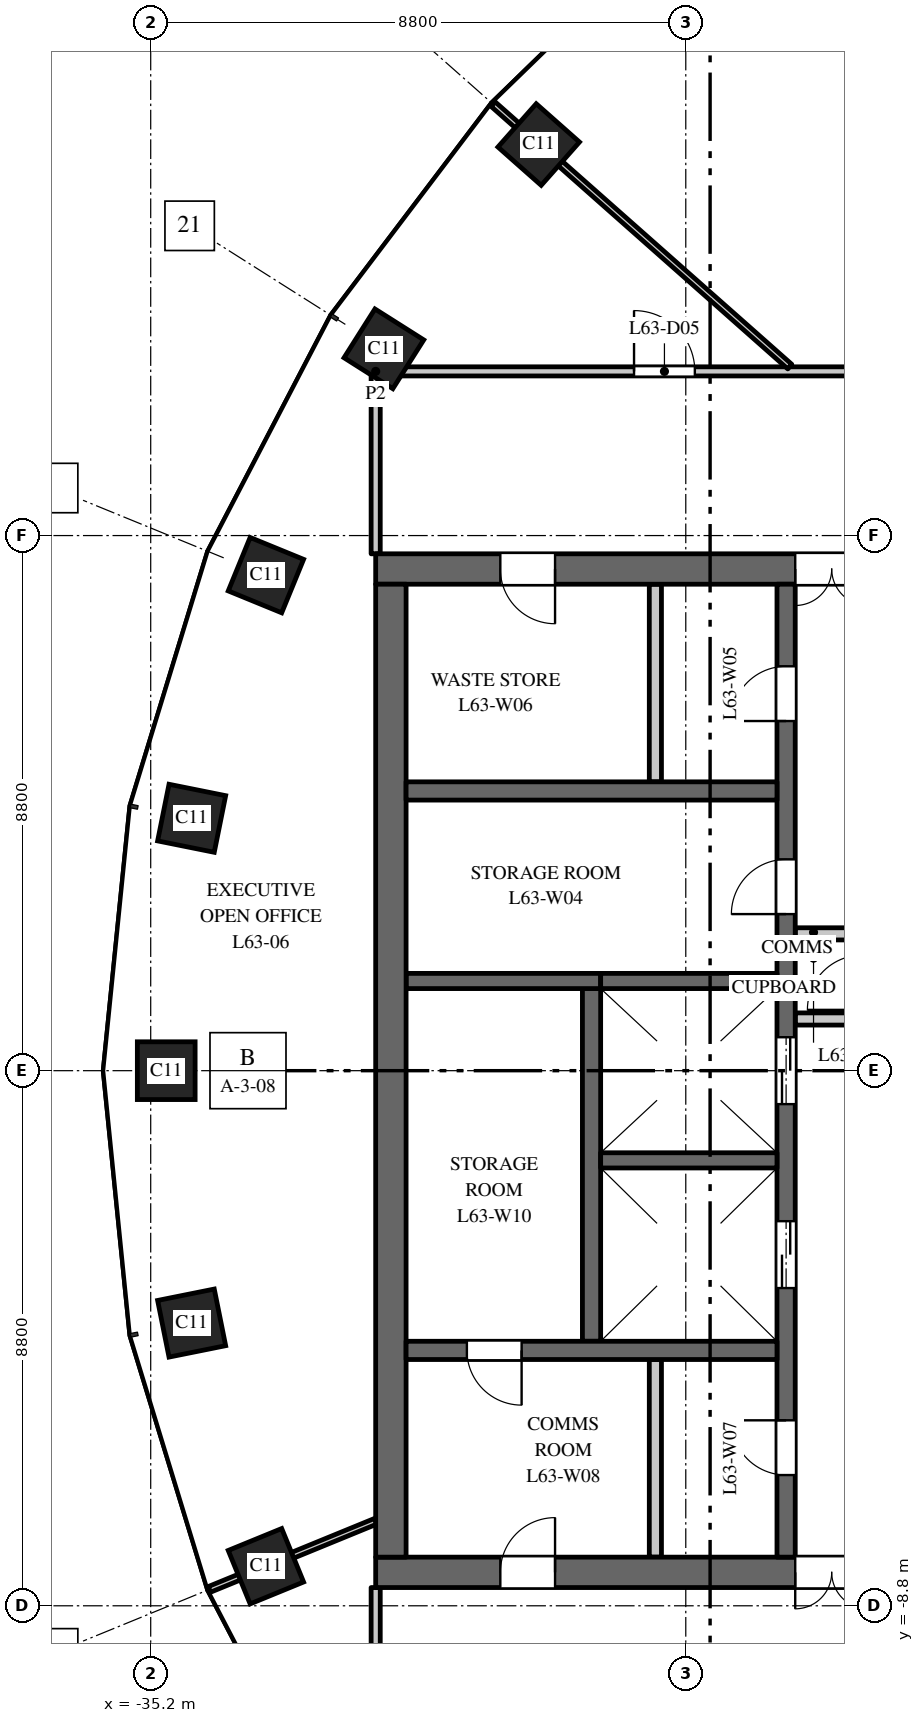
"""IFC4 building model, lengths in metres.
Left out: names, types, materials, properties, quantities, classifications, styles, units other than length and angle.
Written with IfcOpenShell. Run it as: python <this file> out.ifc"""

import sys

from ifc_helpers import new_model, si_unit, direction, frame, frame_2d, origin, origin_2d, place, context, subcontext, project, spatial, rectangle, extrude, element, fill, save


model = new_model("IFC4")
c1 = context("Model", 3, precision=1e-05, world=origin(), true_north=direction((0.0, 1.0)))
c2 = subcontext(c1, "Body", "Model", "MODEL_VIEW")
j1 = project(units=[si_unit("LENGTHUNIT", "METRE"), si_unit("PLANEANGLEUNIT", "RADIAN")], contexts=[c1])
p1 = place(None, origin())
s1 = spatial("IfcSite", under=j1, at=p1, CompositionType="ELEMENT")
p2 = place(p1, origin())
s2 = spatial("IfcBuilding", under=s1, at=p2, CompositionType="ELEMENT")
p3 = place(p2, frame((0.0, 0.0, 295.0)))
s3 = spatial("IfcBuildingStorey", under=s2, at=p3, CompositionType="ELEMENT", Elevation=295.0)
for number, where, z_axis, x_axis in (
    (1, (-28.819, 15.23, 0.0), (0.0, 0.0, 1.0), (-0.663, -0.749, 0.0)),
    (2, (-31.365, 11.871, 0.0), (0.0, 0.0, 1.0), (-0.535, -0.845, 0.0)),
    (3, (-33.305, 8.149, 0.0), (0.0, 0.0, 1.0), (-0.379, -0.925, 0.0)),
    (4, (-34.527, 4.151, 0.0), (0.0, 0.0, 1.0), (-0.197, -0.98, 0.0)),
    (5, (-34.945, 0.0, 0.0), (0.0, 0.0, 1.0), (0.0, -1.0, 0.0)),
    (6, (-34.527, -4.151, 0.0), (0.0, 0.0, 1.0), (0.197, -0.98, 0.0)),
    (7, (-33.305, -8.149, 0.0), (0.0, 0.0, 1.0), (0.379, -0.925, 0.0)),
):
    element("IfcColumn", number, at=place(p3, frame(where, z_axis=z_axis, x_axis=x_axis)), inside=s3, PredefinedType="COLUMN", context=c2, shape_type="SweptSolid", body=[
        extrude(rectangle(XDim=0.95, YDim=0.95, at=origin_2d()), origin(), (0.0, 0.0, 1.0), 4.0),
    ])
p4 = place(p3, frame((-16.5, 8.25, 0.0), z_axis=(0.0, 0.0, 1.0), x_axis=(-1.0, 0.0, 0.0)))
e8 = element("IfcWall", 8, at=p4, inside=s3, PredefinedType="SHEAR", context=c2, shape_type="SweptSolid", body=[
    extrude(rectangle(XDim=15.0, YDim=0.5, at=frame_2d((7.5, 0.0))), origin(), (0.0, 0.0, 1.0), 3.7),
])
p5 = place(p4, frame((6.9, 0.0, 0.0)))
e9 = element("IfcOpeningElement", 9, at=p5, cuts=e8, PredefinedType="OPENING", context=c2, shape_type="SweptSolid", body=[
    extrude(rectangle(XDim=1.2, YDim=2.1, at=frame_2d((0.6, 1.05))), frame((0.0, 0.26, 0.0), z_axis=(0.0, -1.0, 0.0), x_axis=(1.0, 0.0, 0.0)), (0.0, 0.0, 1.0), 0.52),
])
p6 = place(p4, frame((12.05, 0.0, 0.0)))
e10 = element("IfcOpeningElement", 10, at=p6, cuts=e8, PredefinedType="OPENING", context=c2, shape_type="SweptSolid", body=[
    extrude(rectangle(XDim=0.9, YDim=2.1, at=frame_2d((0.45, 1.05))), frame((0.0, 0.26, 0.0), z_axis=(0.0, -1.0, 0.0), x_axis=(1.0, 0.0, 0.0)), (0.0, 0.0, 1.0), 0.52),
])
p7 = place(p3, frame((-16.5, -8.25, 0.0), z_axis=(0.0, 0.0, 1.0), x_axis=(-1.0, 0.0, 0.0)))
e11 = element("IfcWall", 11, at=p7, inside=s3, PredefinedType="SHEAR", context=c2, shape_type="SweptSolid", body=[
    extrude(rectangle(XDim=15.0, YDim=0.5, at=frame_2d((7.5, 0.0))), origin(), (0.0, 0.0, 1.0), 3.7),
])
p8 = place(p7, frame((6.9, 0.0, 0.0)))
e12 = element("IfcOpeningElement", 12, at=p8, cuts=e11, PredefinedType="OPENING", context=c2, shape_type="SweptSolid", body=[
    extrude(rectangle(XDim=1.2, YDim=2.1, at=frame_2d((0.6, 1.05))), frame((0.0, 0.26, 0.0), z_axis=(0.0, -1.0, 0.0), x_axis=(1.0, 0.0, 0.0)), (0.0, 0.0, 1.0), 0.52),
])
p9 = place(p7, frame((12.05, 0.0, 0.0)))
e13 = element("IfcOpeningElement", 13, at=p9, cuts=e11, PredefinedType="OPENING", context=c2, shape_type="SweptSolid", body=[
    extrude(rectangle(XDim=0.9, YDim=2.1, at=frame_2d((0.45, 1.05))), frame((0.0, 0.26, 0.0), z_axis=(0.0, -1.0, 0.0), x_axis=(1.0, 0.0, 0.0)), (0.0, 0.0, 1.0), 0.52),
])
p10 = place(p3, frame((-27.95, -4.45, 0.0), z_axis=(0.0, 0.0, 1.0), x_axis=(0.0, 1.0, 0.0)))
e14 = element("IfcWall", 14, at=p10, inside=s3, PredefinedType="SHEAR", context=c2, shape_type="SweptSolid", body=[
    extrude(rectangle(XDim=5.8, YDim=0.3, at=frame_2d((2.9, 0.0))), origin(), (0.0, 0.0, 1.0), 3.7),
])
p11 = place(p3, frame((-27.8, 1.475, 0.0), z_axis=(0.0, 0.0, 1.0), x_axis=(-1.0, 0.0, 0.0)))
e15 = element("IfcWall", 15, at=p11, inside=s3, PredefinedType="SHEAR", context=c2, shape_type="SweptSolid", body=[
    extrude(rectangle(XDim=3.2, YDim=0.25, at=frame_2d((1.6, 0.0))), origin(), (0.0, 0.0, 1.0), 3.7),
])
p12 = place(p3, frame((-24.75, -8.0, 0.0), z_axis=(0.0, 0.0, 1.0), x_axis=(0.0, 1.0, 0.0)))
e16 = element("IfcWall", 16, at=p12, inside=s3, PredefinedType="SHEAR", context=c2, shape_type="SweptSolid", body=[
    extrude(rectangle(XDim=16.0, YDim=0.3, at=frame_2d((8.0, 0.0))), origin(), (0.0, 0.0, 1.0), 3.7),
])
p13 = place(p12, frame((4.425, 0.0, 0.0)))
e17 = element("IfcOpeningElement", 17, at=p13, cuts=e16, PredefinedType="OPENING", context=c2, shape_type="SweptSolid", body=[
    extrude(rectangle(XDim=1.1, YDim=2.1, at=frame_2d((0.55, 1.05))), frame((0.0, 0.16, 0.0), z_axis=(0.0, -1.0, 0.0), x_axis=(1.0, 0.0, 0.0)), (0.0, 0.0, 1.0), 0.32),
])
p14 = place(p12, frame((7.45, 0.0, 0.0)))
e18 = element("IfcOpeningElement", 18, at=p14, cuts=e16, PredefinedType="OPENING", context=c2, shape_type="SweptSolid", body=[
    extrude(rectangle(XDim=1.1, YDim=2.1, at=frame_2d((0.55, 1.05))), frame((0.0, 0.16, 0.0), z_axis=(0.0, -1.0, 0.0), x_axis=(1.0, 0.0, 0.0)), (0.0, 0.0, 1.0), 0.32),
])
p15 = place(p12, frame((10.575, 0.0, 0.0)))
e19 = element("IfcOpeningElement", 19, at=p15, cuts=e16, PredefinedType="OPENING", context=c2, shape_type="SweptSolid", body=[
    extrude(rectangle(XDim=0.9, YDim=2.1, at=frame_2d((0.45, 1.05))), frame((0.0, 0.16, 0.0), z_axis=(0.0, -1.0, 0.0), x_axis=(1.0, 0.0, 0.0)), (0.0, 0.0, 1.0), 0.32),
])
p16 = place(p12, frame((13.75, 0.0, 0.0)))
e20 = element("IfcOpeningElement", 20, at=p16, cuts=e16, PredefinedType="OPENING", context=c2, shape_type="SweptSolid", body=[
    extrude(rectangle(XDim=0.9, YDim=2.1, at=frame_2d((0.45, 1.05))), frame((0.0, 0.16, 0.0), z_axis=(0.0, -1.0, 0.0), x_axis=(1.0, 0.0, 0.0)), (0.0, 0.0, 1.0), 0.32),
])
p17 = place(p12, frame((1.35, 0.0, 0.0)))
e21 = element("IfcOpeningElement", 21, at=p17, cuts=e16, PredefinedType="OPENING", context=c2, shape_type="SweptSolid", body=[
    extrude(rectangle(XDim=0.9, YDim=2.1, at=frame_2d((0.45, 1.05))), frame((0.0, 0.16, 0.0), z_axis=(0.0, -1.0, 0.0), x_axis=(1.0, 0.0, 0.0)), (0.0, 0.0, 1.0), 0.32),
])
for number, where, z_axis, x_axis in (
    (22, (-23.4, 0.85, 0.0), (0.0, 0.0, 1.0), (-1.0, 0.0, 0.0)),
    (23, (-23.4, 2.25, 0.0), (0.0, 0.0, 1.0), (-1.0, 0.0, 0.0)),
):
    element("IfcWall", number, at=place(p3, frame(where, z_axis=z_axis, x_axis=x_axis)), inside=s3, PredefinedType="PARTITIONING", context=c2, shape_type="SweptSolid", body=[
        extrude(rectangle(XDim=1.2, YDim=0.2, at=frame_2d((0.6, 0.0))), origin(), (0.0, 0.0, 1.0), 3.7),
    ])
p18 = place(p3, frame((-31.25, -8.0, 0.0), z_axis=(0.0, 0.0, 1.0), x_axis=(0.0, 1.0, 0.0)))
e24 = element("IfcWall", 24, at=p18, inside=s3, PredefinedType="SHEAR", context=c2, shape_type="SweptSolid", body=[
    extrude(rectangle(XDim=16.0, YDim=0.5, at=frame_2d((8.0, 0.0))), origin(), (0.0, 0.0, 1.0), 3.7),
])
p19 = place(p3, frame((-24.9, 4.6, 0.0), z_axis=(0.0, 0.0, 1.0), x_axis=(-1.0, 0.0, 0.0)))
e25 = element("IfcWall", 25, at=p19, inside=s3, PredefinedType="SHEAR", context=c2, shape_type="SweptSolid", body=[
    extrude(rectangle(XDim=6.1, YDim=0.3, at=frame_2d((3.05, 0.0))), origin(), (0.0, 0.0, 1.0), 3.7),
])
for number, where, z_axis, x_axis in (
    (26, (-26.9, 4.75, 0.0), (0.0, 0.0, 1.0), (0.0, 1.0, 0.0)),
    (27, (-26.9, -8.0, 0.0), (0.0, 0.0, 1.0), (0.0, 1.0, 0.0)),
):
    element("IfcWall", number, at=place(p3, frame(where, z_axis=z_axis, x_axis=x_axis)), inside=s3, PredefinedType="PARTITIONING", context=c2, shape_type="SweptSolid", body=[
        extrude(rectangle(XDim=3.25, YDim=0.2, at=frame_2d((1.625, 0.0))), origin(), (0.0, 0.0, 1.0), 3.7),
    ])
p20 = place(p3, frame((-24.9, -4.6, 0.0), z_axis=(0.0, 0.0, 1.0), x_axis=(-1.0, 0.0, 0.0)))
e28 = element("IfcWall", 28, at=p20, inside=s3, PredefinedType="SHEAR", context=c2, shape_type="SweptSolid", body=[
    extrude(rectangle(XDim=6.1, YDim=0.3, at=frame_2d((3.05, 0.0))), origin(), (0.0, 0.0, 1.0), 3.7),
])
p21 = place(p20, frame((4.2, 0.0, 0.0)))
e29 = element("IfcOpeningElement", 29, at=p21, cuts=e28, PredefinedType="OPENING", context=c2, shape_type="SweptSolid", body=[
    extrude(rectangle(XDim=0.9, YDim=2.1, at=frame_2d((0.45, 1.05))), frame((0.0, 0.16, 0.0), z_axis=(0.0, -1.0, 0.0), x_axis=(1.0, 0.0, 0.0)), (0.0, 0.0, 1.0), 0.32),
])
for number, where, z_axis, x_axis in (
    (30, (-24.9, -1.475, 0.0), (0.0, 0.0, 1.0), (-1.0, 0.0, 0.0)),
    (31, (-24.9, 1.475, 0.0), (0.0, 0.0, 1.0), (-1.0, 0.0, 0.0)),
):
    element("IfcWall", number, at=place(p3, frame(where, z_axis=z_axis, x_axis=x_axis)), inside=s3, PredefinedType="SHEAR", context=c2, shape_type="SweptSolid", body=[
        extrude(rectangle(XDim=2.9, YDim=0.25, at=frame_2d((1.45, 0.0))), origin(), (0.0, 0.0, 1.0), 3.7),
    ])
p22 = place(p3, frame((-34.234, -8.53, 0.0), z_axis=(0.0, 0.0, 1.0), x_axis=(0.925344112436, 0.379128307542, 0.0)))
e32 = element("IfcWall", 32, at=p22, inside=s3, PredefinedType="PARTITIONING", context=c2, shape_type="SweptSolid", body=[
    extrude(rectangle(XDim=2.954, YDim=0.1, at=frame_2d((1.477, 0.0))), origin(), (0.0, 0.0, 1.0), 3.0),
])
for number, where, z_axis, x_axis in (
    (33, (-31.5, -11.5, 0.0), (0.0, 0.0, 1.0), (0.0, 1.0, 0.0)),
    (34, (-31.5, 8.5, 0.0), (0.0, 0.0, 1.0), (0.0, 1.0, 0.0)),
):
    element("IfcWall", number, at=place(p3, frame(where, z_axis=z_axis, x_axis=x_axis)), inside=s3, PredefinedType="PARTITIONING", context=c2, shape_type="SweptSolid", body=[
        extrude(rectangle(XDim=3.0, YDim=0.15, at=frame_2d((1.5, 0.0))), origin(), (0.0, 0.0, 1.0), 3.0),
    ])
p23 = place(p3, frame((-31.5, 11.5, 0.0), z_axis=(0.0, 0.0, 1.0), x_axis=(1.0, 0.0, 0.0)))
e35 = element("IfcWall", 35, at=p23, inside=s3, PredefinedType="PARTITIONING", context=c2, shape_type="SweptSolid", body=[
    extrude(rectangle(XDim=27.238, YDim=0.15, at=frame_2d((13.619, 0.0))), origin(), (0.0, 0.0, 1.0), 2.75),
])
p24 = place(p23, frame((4.249, 0.0, 0.0)))
e36 = element("IfcOpeningElement", 36, at=p24, cuts=e35, PredefinedType="OPENING", context=c2, shape_type="SweptSolid", body=[
    extrude(rectangle(XDim=1.0, YDim=2.1, at=frame_2d((0.5, 1.05))), frame((0.0, 0.085, 0.0), z_axis=(0.0, -1.0, 0.0), x_axis=(1.0, 0.0, 0.0)), (0.0, 0.0, 1.0), 0.17),
])
p25 = place(p23, frame((25.608, 0.0, 0.0)))
e37 = element("IfcOpeningElement", 37, at=p25, cuts=e35, PredefinedType="OPENING", context=c2, shape_type="SweptSolid", body=[
    extrude(rectangle(XDim=1.0, YDim=2.1, at=frame_2d((0.5, 1.05))), frame((0.0, 0.085, 0.0), z_axis=(0.0, -1.0, 0.0), x_axis=(1.0, 0.0, 0.0)), (0.0, 0.0, 1.0), 0.17),
])
p26 = place(p3, frame((-29.569, 15.895, 0.0), z_axis=(0.0, 0.0, 1.0), x_axis=(0.748988695283, -0.662582775461, 0.0)))
e38 = element("IfcWall", 38, at=p26, inside=s3, PredefinedType="PARTITIONING", context=c2, shape_type="SweptSolid", body=[
    extrude(rectangle(XDim=6.516, YDim=0.1, at=frame_2d((3.258, 0.0))), origin(), (0.0, 0.0, 1.0), 3.0),
])
p27 = place(p13, origin())
e39 = element("IfcDoor", 39, at=p27, inside=s3, OperationType="DOUBLE_DOOR_SLIDING", PredefinedType="DOOR", context=c2, shape_type="SweptSolid", body=[
    extrude(rectangle(XDim=1.1, YDim=2.1, at=frame_2d((0.55, 1.05))), frame((0.0, 0.025, 0.0), z_axis=(0.0, -1.0, 0.0), x_axis=(1.0, 0.0, 0.0)), (0.0, 0.0, 1.0), 0.05),
])
fill(e17, e39)
p28 = place(p14, origin())
e40 = element("IfcDoor", 40, at=p28, inside=s3, OperationType="DOUBLE_DOOR_SLIDING", PredefinedType="DOOR", context=c2, shape_type="SweptSolid", body=[
    extrude(rectangle(XDim=1.1, YDim=2.1, at=frame_2d((0.55, 1.05))), frame((0.0, 0.025, 0.0), z_axis=(0.0, -1.0, 0.0), x_axis=(1.0, 0.0, 0.0)), (0.0, 0.0, 1.0), 0.05),
])
fill(e18, e40)
p29 = place(p5, origin())
e41 = element("IfcDoor", 41, at=p29, inside=s3, OperationType="DOUBLE_DOOR_DOUBLE_SWING", PredefinedType="DOOR", context=c2, shape_type="SweptSolid", body=[
    extrude(rectangle(XDim=1.2, YDim=2.1, at=frame_2d((0.6, 1.05))), frame((0.0, 0.025, 0.0), z_axis=(0.0, -1.0, 0.0), x_axis=(1.0, 0.0, 0.0)), (0.0, 0.0, 1.0), 0.05),
])
fill(e9, e41)
p30 = place(p8, origin())
e42 = element("IfcDoor", 42, at=p30, inside=s3, OperationType="DOUBLE_DOOR_DOUBLE_SWING", PredefinedType="DOOR", context=c2, shape_type="SweptSolid", body=[
    extrude(rectangle(XDim=1.2, YDim=2.1, at=frame_2d((0.6, 1.05))), frame((0.0, 0.025, 0.0), z_axis=(0.0, -1.0, 0.0), x_axis=(1.0, 0.0, 0.0)), (0.0, 0.0, 1.0), 0.05),
])
fill(e12, e42)
p31 = place(p15, origin())
e43 = element("IfcDoor", 43, at=p31, inside=s3, OperationType="SINGLE_SWING_RIGHT", PredefinedType="DOOR", context=c2, shape_type="SweptSolid", body=[
    extrude(rectangle(XDim=0.9, YDim=2.1, at=frame_2d((0.45, 1.05))), frame((0.0, 0.025, 0.0), z_axis=(0.0, -1.0, 0.0), x_axis=(1.0, 0.0, 0.0)), (0.0, 0.0, 1.0), 0.05),
])
fill(e19, e43)
p32 = place(p16, origin())
e44 = element("IfcDoor", 44, at=p32, inside=s3, OperationType="SINGLE_SWING_RIGHT", PredefinedType="DOOR", context=c2, shape_type="SweptSolid", body=[
    extrude(rectangle(XDim=0.9, YDim=2.1, at=frame_2d((0.45, 1.05))), frame((0.0, 0.025, 0.0), z_axis=(0.0, -1.0, 0.0), x_axis=(1.0, 0.0, 0.0)), (0.0, 0.0, 1.0), 0.05),
])
fill(e20, e44)
p33 = place(p6, origin())
e45 = element("IfcDoor", 45, at=p33, inside=s3, OperationType="SINGLE_SWING_RIGHT", PredefinedType="DOOR", context=c2, shape_type="SweptSolid", body=[
    extrude(rectangle(XDim=0.9, YDim=2.1, at=frame_2d((0.45, 1.05))), frame((0.0, 0.025, 0.0), z_axis=(0.0, -1.0, 0.0), x_axis=(1.0, 0.0, 0.0)), (0.0, 0.0, 1.0), 0.05),
])
fill(e10, e45)
p34 = place(p17, origin())
e46 = element("IfcDoor", 46, at=p34, inside=s3, OperationType="SINGLE_SWING_LEFT", PredefinedType="DOOR", context=c2, shape_type="SweptSolid", body=[
    extrude(rectangle(XDim=0.9, YDim=2.1, at=frame_2d((0.45, 1.05))), frame((0.0, 0.025, 0.0), z_axis=(0.0, -1.0, 0.0), x_axis=(1.0, 0.0, 0.0)), (0.0, 0.0, 1.0), 0.05),
])
fill(e21, e46)
p35 = place(p9, origin())
e47 = element("IfcDoor", 47, at=p35, inside=s3, OperationType="SINGLE_SWING_LEFT", PredefinedType="DOOR", context=c2, shape_type="SweptSolid", body=[
    extrude(rectangle(XDim=0.9, YDim=2.1, at=frame_2d((0.45, 1.05))), frame((0.0, 0.025, 0.0), z_axis=(0.0, -1.0, 0.0), x_axis=(1.0, 0.0, 0.0)), (0.0, 0.0, 1.0), 0.05),
])
fill(e13, e47)
p36 = place(p21, origin())
e48 = element("IfcDoor", 48, at=p36, inside=s3, OperationType="SINGLE_SWING_RIGHT", PredefinedType="DOOR", context=c2, shape_type="SweptSolid", body=[
    extrude(rectangle(XDim=0.9, YDim=2.1, at=frame_2d((0.45, 1.05))), frame((0.0, 0.025, 0.0), z_axis=(0.0, -1.0, 0.0), x_axis=(1.0, 0.0, 0.0)), (0.0, 0.0, 1.0), 0.05),
])
fill(e29, e48)
p37 = place(p24, origin())
e49 = element("IfcDoor", 49, at=p37, inside=s3, OperationType="SINGLE_SWING_LEFT", PredefinedType="DOOR", context=c2, shape_type="SweptSolid", body=[
    extrude(rectangle(XDim=1.0, YDim=2.1, at=frame_2d((0.5, 1.05))), frame((0.0, 0.025, 0.0), z_axis=(0.0, -1.0, 0.0), x_axis=(1.0, 0.0, 0.0)), (0.0, 0.0, 1.0), 0.05),
])
fill(e36, e49)
save(model, sys.argv[1])
